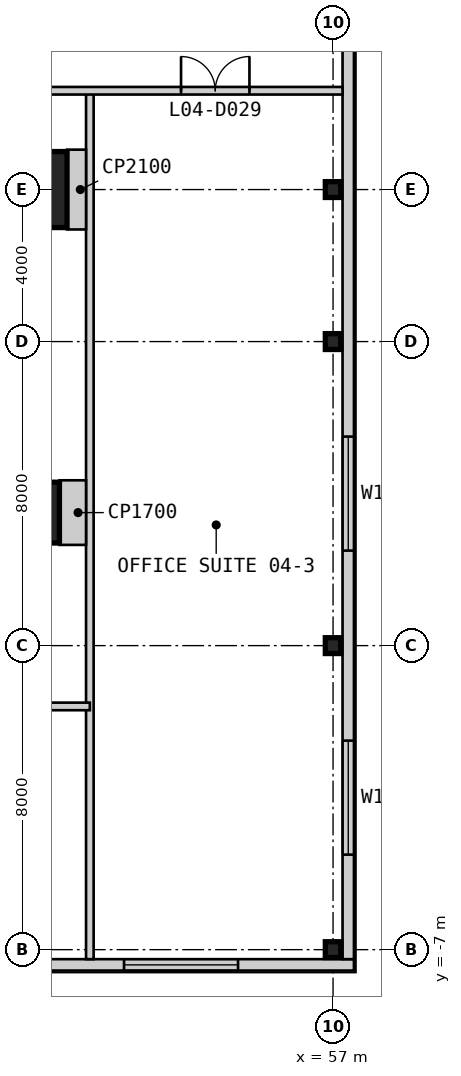
"""IFC4 building model, lengths in metres.
Left out: names, types, materials, properties, quantities, classifications, styles, units other than length and angle.
Written with IfcOpenShell. Run it as: python <this file> out.ifc"""

import sys

from ifc_helpers import new_model, si_unit, direction, frame, frame_2d, origin, origin_2d, place, context, subcontext, project, spatial, rectangle, i_section, extrude, element, fill, save


model = new_model("IFC4")
c1 = context("Model", 3, precision=1e-05, world=origin(), true_north=direction((0.0, 1.0)))
c2 = subcontext(c1, "Body", "Model", "MODEL_VIEW")
j1 = project(units=[si_unit("LENGTHUNIT", "METRE"), si_unit("PLANEANGLEUNIT", "RADIAN")], contexts=[c1])
p1 = place(None, origin())
s1 = spatial("IfcSite", under=j1, at=p1, CompositionType="ELEMENT")
p2 = place(p1, origin())
s2 = spatial("IfcBuilding", under=s1, at=p2, CompositionType="ELEMENT")
p3 = place(p2, frame((0.0, 0.0, 21.4)))
s3 = spatial("IfcBuildingStorey", under=s2, at=p3, CompositionType="ELEMENT", Elevation=21.4)
p4 = place(p3, frame((49.0, 4.5, 0.0), z_axis=(0.0, 0.0, 1.0), x_axis=(1.0, 0.0, 0.0)))
e1 = element("IfcColumn", 1, at=p4, inside=s3, PredefinedType="COLUMN", context=c2, shape_type="SweptSolid", body=[
    extrude(rectangle(XDim=1.6, YDim=1.6, at=origin_2d()), origin(), (0.0, 0.0, 1.0), 4.8),
])
p5 = place(p3, frame((49.0, 13.0, 0.0), z_axis=(0.0, 0.0, 1.0), x_axis=(1.0, 0.0, 0.0)))
e2 = element("IfcColumn", 2, at=p5, inside=s3, PredefinedType="COLUMN", context=c2, shape_type="SweptSolid", body=[
    extrude(rectangle(XDim=2.0, YDim=2.0, at=origin_2d()), origin(), (0.0, 0.0, 1.0), 4.8),
])
for number, where, z_axis, x_axis in (
    (3, (57.0, -7.0, 0.0), (0.0, 0.0, 1.0), (1.0, 0.0, 0.0)),
    (4, (57.0, 1.0, 0.0), (0.0, 0.0, 1.0), (1.0, 0.0, 0.0)),
    (5, (57.0, 9.0, 0.0), (0.0, 0.0, 1.0), (1.0, 0.0, 0.0)),
    (6, (57.0, 13.0, 0.0), (0.0, 0.0, 1.0), (1.0, 0.0, 0.0)),
):
    element("IfcColumn", number, at=place(p3, frame(where, z_axis=z_axis, x_axis=x_axis)), inside=s3, PredefinedType="COLUMN", context=c2, shape_type="SweptSolid", body=[
        extrude(i_section(OverallWidth=0.406, OverallDepth=0.417, WebThickness=0.03, FlangeThickness=0.048, at=origin_2d()), origin(), (0.0, 0.0, 1.0), 4.8),
    ])
p6 = place(p3, frame((-7.55, -7.4, 0.0), z_axis=(0.0, 0.0, 1.0), x_axis=(1.0, 0.0, 0.0)))
e7 = element("IfcWall", 7, at=p6, inside=s3, PredefinedType="SOLIDWALL", context=c2, shape_type="SweptSolid", body=[
    extrude(rectangle(XDim=65.1, YDim=0.3, at=frame_2d((32.55, 0.0))), origin(), (0.0, 0.0, 1.0), 4.5),
])
p7 = place(p6, frame((3.05, 0.0, 0.9)))
e8 = element("IfcOpeningElement", 8, at=p7, cuts=e7, PredefinedType="OPENING", context=c2, shape_type="SweptSolid", body=[
    extrude(rectangle(XDim=3.0, YDim=2.4, at=frame_2d((1.5, 1.2))), frame((0.0, 0.16, 0.0), z_axis=(0.0, -1.0, 0.0), x_axis=(1.0, 0.0, 0.0)), (0.0, 0.0, 1.0), 0.32),
])
p8 = place(p6, frame((11.05, 0.0, 0.9)))
e9 = element("IfcOpeningElement", 9, at=p8, cuts=e7, PredefinedType="OPENING", context=c2, shape_type="SweptSolid", body=[
    extrude(rectangle(XDim=3.0, YDim=2.4, at=frame_2d((1.5, 1.2))), frame((0.0, 0.16, 0.0), z_axis=(0.0, -1.0, 0.0), x_axis=(1.0, 0.0, 0.0)), (0.0, 0.0, 1.0), 0.32),
])
p9 = place(p6, frame((25.05, 0.0, 0.9)))
e10 = element("IfcOpeningElement", 10, at=p9, cuts=e7, PredefinedType="OPENING", context=c2, shape_type="SweptSolid", body=[
    extrude(rectangle(XDim=3.0, YDim=2.4, at=frame_2d((1.5, 1.2))), frame((0.0, 0.16, 0.0), z_axis=(0.0, -1.0, 0.0), x_axis=(1.0, 0.0, 0.0)), (0.0, 0.0, 1.0), 0.32),
])
p10 = place(p6, frame((37.05, 0.0, 0.9)))
e11 = element("IfcOpeningElement", 11, at=p10, cuts=e7, PredefinedType="OPENING", context=c2, shape_type="SweptSolid", body=[
    extrude(rectangle(XDim=3.0, YDim=2.4, at=frame_2d((1.5, 1.2))), frame((0.0, 0.16, 0.0), z_axis=(0.0, -1.0, 0.0), x_axis=(1.0, 0.0, 0.0)), (0.0, 0.0, 1.0), 0.32),
])
p11 = place(p6, frame((45.55, 0.0, 0.9)))
e12 = element("IfcOpeningElement", 12, at=p11, cuts=e7, PredefinedType="OPENING", context=c2, shape_type="SweptSolid", body=[
    extrude(rectangle(XDim=3.0, YDim=2.4, at=frame_2d((1.5, 1.2))), frame((0.0, 0.16, 0.0), z_axis=(0.0, -1.0, 0.0), x_axis=(1.0, 0.0, 0.0)), (0.0, 0.0, 1.0), 0.32),
])
p12 = place(p6, frame((51.55, 0.0, 0.9)))
e13 = element("IfcOpeningElement", 13, at=p12, cuts=e7, PredefinedType="OPENING", context=c2, shape_type="SweptSolid", body=[
    extrude(rectangle(XDim=3.0, YDim=2.4, at=frame_2d((1.5, 1.2))), frame((0.0, 0.16, 0.0), z_axis=(0.0, -1.0, 0.0), x_axis=(1.0, 0.0, 0.0)), (0.0, 0.0, 1.0), 0.32),
])
p13 = place(p6, frame((59.05, 0.0, 0.9)))
e14 = element("IfcOpeningElement", 14, at=p13, cuts=e7, PredefinedType="OPENING", context=c2, shape_type="SweptSolid", body=[
    extrude(rectangle(XDim=3.0, YDim=2.4, at=frame_2d((1.5, 1.2))), frame((0.0, 0.16, 0.0), z_axis=(0.0, -1.0, 0.0), x_axis=(1.0, 0.0, 0.0)), (0.0, 0.0, 1.0), 0.32),
])
p14 = place(p3, frame((57.4, -7.25, 0.0), z_axis=(0.0, 0.0, 1.0), x_axis=(0.0, 1.0, 0.0)))
e15 = element("IfcWall", 15, at=p14, inside=s3, PredefinedType="SOLIDWALL", context=c2, shape_type="SweptSolid", body=[
    extrude(rectangle(XDim=72.5, YDim=0.3, at=frame_2d((36.25, 0.0))), origin(), (0.0, 0.0, 1.0), 4.5),
])
p15 = place(p14, frame((2.75, 0.0, 0.9)))
e16 = element("IfcOpeningElement", 16, at=p15, cuts=e15, PredefinedType="OPENING", context=c2, shape_type="SweptSolid", body=[
    extrude(rectangle(XDim=3.0, YDim=2.4, at=frame_2d((1.5, 1.2))), frame((0.0, 0.16, 0.0), z_axis=(0.0, -1.0, 0.0), x_axis=(1.0, 0.0, 0.0)), (0.0, 0.0, 1.0), 0.32),
])
p16 = place(p14, frame((10.75, 0.0, 0.9)))
e17 = element("IfcOpeningElement", 17, at=p16, cuts=e15, PredefinedType="OPENING", context=c2, shape_type="SweptSolid", body=[
    extrude(rectangle(XDim=3.0, YDim=2.4, at=frame_2d((1.5, 1.2))), frame((0.0, 0.16, 0.0), z_axis=(0.0, -1.0, 0.0), x_axis=(1.0, 0.0, 0.0)), (0.0, 0.0, 1.0), 0.32),
])
p17 = place(p14, frame((24.75, 0.0, 0.9)))
e18 = element("IfcOpeningElement", 18, at=p17, cuts=e15, PredefinedType="OPENING", context=c2, shape_type="SweptSolid", body=[
    extrude(rectangle(XDim=3.0, YDim=2.4, at=frame_2d((1.5, 1.2))), frame((0.0, 0.16, 0.0), z_axis=(0.0, -1.0, 0.0), x_axis=(1.0, 0.0, 0.0)), (0.0, 0.0, 1.0), 0.32),
])
p18 = place(p14, frame((36.75, 0.0, 0.9)))
e19 = element("IfcOpeningElement", 19, at=p18, cuts=e15, PredefinedType="OPENING", context=c2, shape_type="SweptSolid", body=[
    extrude(rectangle(XDim=3.0, YDim=2.4, at=frame_2d((1.5, 1.2))), frame((0.0, 0.16, 0.0), z_axis=(0.0, -1.0, 0.0), x_axis=(1.0, 0.0, 0.0)), (0.0, 0.0, 1.0), 0.32),
])
p19 = place(p14, frame((45.25, 0.0, 0.9)))
e20 = element("IfcOpeningElement", 20, at=p19, cuts=e15, PredefinedType="OPENING", context=c2, shape_type="SweptSolid", body=[
    extrude(rectangle(XDim=3.0, YDim=2.4, at=frame_2d((1.5, 1.2))), frame((0.0, 0.16, 0.0), z_axis=(0.0, -1.0, 0.0), x_axis=(1.0, 0.0, 0.0)), (0.0, 0.0, 1.0), 0.32),
])
p20 = place(p14, frame((51.25, 0.0, 0.9)))
e21 = element("IfcOpeningElement", 21, at=p20, cuts=e15, PredefinedType="OPENING", context=c2, shape_type="SweptSolid", body=[
    extrude(rectangle(XDim=3.0, YDim=2.4, at=frame_2d((1.5, 1.2))), frame((0.0, 0.16, 0.0), z_axis=(0.0, -1.0, 0.0), x_axis=(1.0, 0.0, 0.0)), (0.0, 0.0, 1.0), 0.32),
])
p21 = place(p14, frame((58.75, 0.0, 0.9)))
e22 = element("IfcOpeningElement", 22, at=p21, cuts=e15, PredefinedType="OPENING", context=c2, shape_type="SweptSolid", body=[
    extrude(rectangle(XDim=3.0, YDim=2.4, at=frame_2d((1.5, 1.2))), frame((0.0, 0.16, 0.0), z_axis=(0.0, -1.0, 0.0), x_axis=(1.0, 0.0, 0.0)), (0.0, 0.0, 1.0), 0.32),
])
p22 = place(p14, frame((66.75, 0.0, 0.9)))
e23 = element("IfcOpeningElement", 23, at=p22, cuts=e15, PredefinedType="OPENING", context=c2, shape_type="SweptSolid", body=[
    extrude(rectangle(XDim=3.0, YDim=2.4, at=frame_2d((1.5, 1.2))), frame((0.0, 0.16, 0.0), z_axis=(0.0, -1.0, 0.0), x_axis=(1.0, 0.0, 0.0)), (0.0, 0.0, 1.0), 0.32),
])
p23 = place(p3, frame((50.6, -7.25, 0.0), z_axis=(0.0, 0.0, 1.0), x_axis=(0.0, 1.0, 0.0)))
e24 = element("IfcWall", 24, at=p23, inside=s3, PredefinedType="PARTITIONING", context=c2, shape_type="SweptSolid", body=[
    extrude(rectangle(XDim=22.85, YDim=0.2, at=frame_2d((11.425, 0.0))), origin(), (0.0, 0.0, 1.0), 4.5),
])
p24 = place(p3, frame((26.4, -0.6, 0.0), z_axis=(0.0, 0.0, 1.0), x_axis=(1.0, 0.0, 0.0)))
e25 = element("IfcWall", 25, at=p24, inside=s3, PredefinedType="PARTITIONING", context=c2, shape_type="SweptSolid", body=[
    extrude(rectangle(XDim=24.2, YDim=0.2, at=frame_2d((12.1, 0.0))), origin(), (0.0, 0.0, 1.0), 4.5),
])
p25 = place(p3, frame((43.0, 15.6, 0.0), z_axis=(0.0, 0.0, 1.0), x_axis=(1.0, 0.0, 0.0)))
e26 = element("IfcWall", 26, at=p25, inside=s3, PredefinedType="PARTITIONING", context=c2, shape_type="SweptSolid", body=[
    extrude(rectangle(XDim=14.25, YDim=0.2, at=frame_2d((7.125, 0.0))), origin(), (0.0, 0.0, 1.0), 4.5),
])
p26 = place(p25, frame((10.0, 0.0, 0.0)))
e27 = element("IfcOpeningElement", 27, at=p26, cuts=e26, PredefinedType="OPENING", context=c2, shape_type="SweptSolid", body=[
    extrude(rectangle(XDim=1.8, YDim=2.4, at=frame_2d((0.9, 1.2))), frame((0.0, 0.11, 0.0), z_axis=(0.0, -1.0, 0.0), x_axis=(1.0, 0.0, 0.0)), (0.0, 0.0, 1.0), 0.22),
])
p27 = place(p25, frame((2.925, 0.0, 0.0)))
e28 = element("IfcOpeningElement", 28, at=p27, cuts=e26, PredefinedType="OPENING", context=c2, shape_type="SweptSolid", body=[
    extrude(rectangle(XDim=1.8, YDim=2.4, at=frame_2d((0.9, 1.2))), frame((0.0, 0.11, 0.0), z_axis=(0.0, -1.0, 0.0), x_axis=(1.0, 0.0, 0.0)), (0.0, 0.0, 1.0), 0.22),
])
p28 = place(p3, frame((50.5, 4.5, 0.0), z_axis=(0.0, 0.0, 1.0), x_axis=(-1.0, 0.0, 0.0)))
e29 = element("IfcWall", 29, at=p28, inside=s3, PredefinedType="PARTITIONING", context=c2, shape_type="SweptSolid", body=[
    extrude(rectangle(XDim=0.7, YDim=1.7, at=frame_2d((0.35, 0.0))), origin(), (0.0, 0.0, 1.0), 4.5),
])
p29 = place(p3, frame((50.5, 13.0, 0.0), z_axis=(0.0, 0.0, 1.0), x_axis=(-1.0, 0.0, 0.0)))
e30 = element("IfcWall", 30, at=p29, inside=s3, PredefinedType="PARTITIONING", context=c2, shape_type="SweptSolid", body=[
    extrude(rectangle(XDim=0.5, YDim=2.1, at=frame_2d((0.25, 0.0))), origin(), (0.0, 0.0, 1.0), 4.5),
])
p30 = place(p13, origin())
e31 = element("IfcWindow", 31, at=p30, inside=s3, PartitioningType="SINGLE_PANEL", PredefinedType="WINDOW", context=c2, shape_type="SweptSolid", body=[
    extrude(rectangle(XDim=3.0, YDim=2.4, at=frame_2d((1.5, 1.2))), frame((0.0, 0.03, 0.0), z_axis=(0.0, -1.0, 0.0), x_axis=(1.0, 0.0, 0.0)), (0.0, 0.0, 1.0), 0.06),
])
fill(e14, e31)
p31 = place(p15, origin())
e32 = element("IfcWindow", 32, at=p31, inside=s3, PartitioningType="SINGLE_PANEL", PredefinedType="WINDOW", context=c2, shape_type="SweptSolid", body=[
    extrude(rectangle(XDim=3.0, YDim=2.4, at=frame_2d((1.5, 1.2))), frame((0.0, 0.03, 0.0), z_axis=(0.0, -1.0, 0.0), x_axis=(1.0, 0.0, 0.0)), (0.0, 0.0, 1.0), 0.06),
])
fill(e16, e32)
p32 = place(p16, origin())
e33 = element("IfcWindow", 33, at=p32, inside=s3, PartitioningType="SINGLE_PANEL", PredefinedType="WINDOW", context=c2, shape_type="SweptSolid", body=[
    extrude(rectangle(XDim=3.0, YDim=2.4, at=frame_2d((1.5, 1.2))), frame((0.0, 0.03, 0.0), z_axis=(0.0, -1.0, 0.0), x_axis=(1.0, 0.0, 0.0)), (0.0, 0.0, 1.0), 0.06),
])
fill(e17, e33)
p33 = place(p26, origin())
e34 = element("IfcDoor", 34, at=p33, inside=s3, OperationType="DOUBLE_DOOR_SINGLE_SWING", PredefinedType="DOOR", context=c2, shape_type="SweptSolid", body=[
    extrude(rectangle(XDim=1.8, YDim=2.4, at=frame_2d((0.9, 1.2))), frame((0.0, 0.025, 0.0), z_axis=(0.0, -1.0, 0.0), x_axis=(1.0, 0.0, 0.0)), (0.0, 0.0, 1.0), 0.05),
])
fill(e27, e34)
save(model, sys.argv[1])
